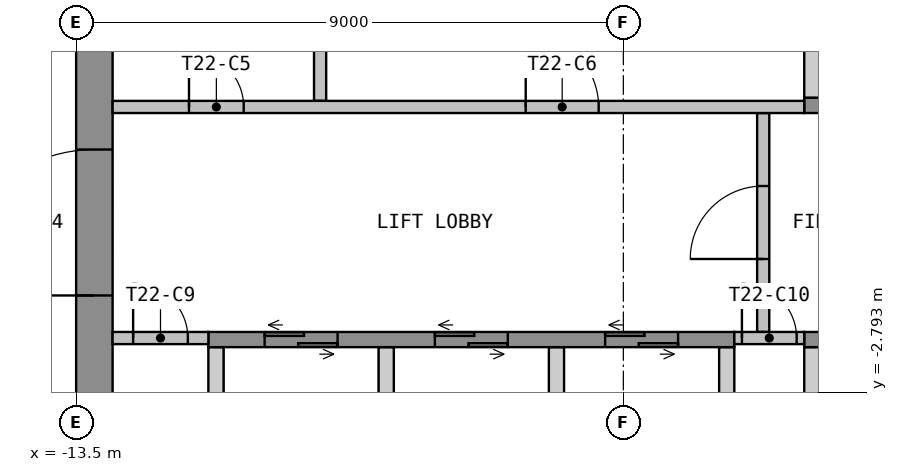
"""IFC4 building model, lengths in metres.
Left out: names, types, materials, properties, quantities, classifications, styles, units other than length and angle.
Written with IfcOpenShell. Run it as: python <this file> out.ifc"""

import sys

from ifc_helpers import new_model, si_unit, direction, frame, frame_2d, origin, place, context, subcontext, project, spatial, polyline, rectangle, outline, extrude, element, fill, save


model = new_model("IFC4")
c1 = context("Model", 3, precision=1e-05, world=origin(), true_north=direction((0.0, 1.0)))
c2 = subcontext(c1, "Body", "Model", "MODEL_VIEW")
j1 = project(units=[si_unit("LENGTHUNIT", "METRE"), si_unit("PLANEANGLEUNIT", "RADIAN")], contexts=[c1])
p1 = place(None, origin())
s1 = spatial("IfcSite", under=j1, at=p1, CompositionType="ELEMENT")
p2 = place(p1, origin())
s2 = spatial("IfcBuilding", under=s1, at=p2, CompositionType="ELEMENT")
p3 = place(p2, frame((0.0, 0.0, 298.2)))
s3 = spatial("IfcBuildingStorey", under=s2, at=p3, CompositionType="ELEMENT", Elevation=298.2)
p4 = place(p3, frame((-13.2, -10.65, 0.0), z_axis=(0.0, 0.0, 1.0), x_axis=(0.0, 1.0, 0.0)))
e1 = element("IfcWall", 1, at=p4, inside=s3, PredefinedType="SHEAR", context=c2, shape_type="SweptSolid", body=[
    extrude(rectangle(XDim=21.3, YDim=0.6, at=frame_2d((10.65, 0.0))), origin(), (0.0, 0.0, 1.0), 3.575),
])
p5 = place(p4, frame((9.45, 0.0, 0.0)))
e2 = element("IfcOpeningElement", 2, at=p5, cuts=e1, PredefinedType="OPENING", context=c2, shape_type="SweptSolid", body=[
    extrude(rectangle(XDim=2.4, YDim=2.1, at=frame_2d((1.2, 1.05))), frame((0.0, 0.31, 0.0), z_axis=(0.0, -1.0, 0.0), x_axis=(1.0, 0.0, 0.0)), (0.0, 0.0, 1.0), 0.62),
])
p6 = place(p3, origin())
e3 = element("IfcWall", 3, at=p6, inside=s3, PredefinedType="SHEAR", context=c2, shape_type="SweptSolid", body=[
    extrude(outline(polyline([(-1.525, 2.05), (-1.275, 2.05), (-1.275, 4.75), (-1.525, 4.75), (-1.525, 2.05)])), origin(), (0.0, 0.0, 1.0), 3.575),
])
p7 = place(p3, frame((-1.525, 1.925, 0.0), z_axis=(0.0, 0.0, 1.0), x_axis=(1.0, 0.0, 0.0)))
e4 = element("IfcWall", 4, at=p7, inside=s3, PredefinedType="SHEAR", context=c2, shape_type="SweptSolid", body=[
    extrude(rectangle(XDim=3.05, YDim=0.25, at=frame_2d((1.525, 0.0))), origin(), (0.0, 0.0, 1.0), 3.575),
])
p8 = place(p7, frame((0.925, 0.0, 0.0)))
e5 = element("IfcOpeningElement", 5, at=p8, cuts=e4, PredefinedType="OPENING", context=c2, shape_type="SweptSolid", body=[
    extrude(rectangle(XDim=1.2, YDim=2.1, at=frame_2d((0.6, 1.05))), frame((0.0, 0.135, 0.0), z_axis=(0.0, -1.0, 0.0), x_axis=(1.0, 0.0, 0.0)), (0.0, 0.0, 1.0), 0.27),
])
p9 = place(p3, origin())
e6 = element("IfcWall", 6, at=p9, inside=s3, PredefinedType="SHEAR", context=c2, shape_type="SweptSolid", body=[
    extrude(outline(polyline([(-11.325, -4.75), (-11.075, -4.75), (-11.075, -2.05), (-11.325, -2.05), (-11.325, -4.75)])), origin(), (0.0, 0.0, 1.0), 3.575),
])
p10 = place(p3, origin())
e7 = element("IfcWall", 7, at=p10, inside=s3, PredefinedType="SHEAR", context=c2, shape_type="SweptSolid", body=[
    extrude(outline(polyline([(-8.525, -4.75), (-8.275, -4.75), (-8.275, -2.05), (-8.525, -2.05), (-8.525, -4.75)])), origin(), (0.0, 0.0, 1.0), 3.575),
])
p11 = place(p3, origin())
e8 = element("IfcWall", 8, at=p11, inside=s3, PredefinedType="SHEAR", context=c2, shape_type="SweptSolid", body=[
    extrude(outline(polyline([(-5.725, -4.75), (-5.475, -4.75), (-5.475, -2.05), (-5.725, -2.05), (-5.725, -4.75)])), origin(), (0.0, 0.0, 1.0), 3.575),
])
p12 = place(p3, origin())
e9 = element("IfcWall", 9, at=p12, inside=s3, PredefinedType="SHEAR", context=c2, shape_type="SweptSolid", body=[
    extrude(outline(polyline([(-2.925, -4.75), (-2.675, -4.75), (-2.675, -2.05), (-2.925, -2.05), (-2.925, -4.75)])), origin(), (0.0, 0.0, 1.0), 3.575),
])
p13 = place(p3, origin())
e10 = element("IfcWall", 10, at=p13, inside=s3, PredefinedType="SHEAR", context=c2, shape_type="SweptSolid", body=[
    extrude(outline(polyline([(-1.525, -4.75), (-1.275, -4.75), (-1.275, -2.05), (-1.525, -2.05), (-1.525, -4.75)])), origin(), (0.0, 0.0, 1.0), 3.575),
])
p14 = place(p3, frame((-11.325, -1.925, 0.0), z_axis=(0.0, 0.0, 1.0), x_axis=(1.0, 0.0, 0.0)))
e11 = element("IfcWall", 11, at=p14, inside=s3, PredefinedType="SHEAR", context=c2, shape_type="SweptSolid", body=[
    extrude(rectangle(XDim=8.65, YDim=0.25, at=frame_2d((4.325, 0.0))), origin(), (0.0, 0.0, 1.0), 3.575),
])
p15 = place(p14, frame((0.925, 0.0, 0.0)))
e12 = element("IfcOpeningElement", 12, at=p15, cuts=e11, PredefinedType="OPENING", context=c2, shape_type="SweptSolid", body=[
    extrude(rectangle(XDim=1.2, YDim=2.1, at=frame_2d((0.6, 1.05))), frame((0.0, 0.135, 0.0), z_axis=(0.0, -1.0, 0.0), x_axis=(1.0, 0.0, 0.0)), (0.0, 0.0, 1.0), 0.27),
])
p16 = place(p14, frame((3.725, 0.0, 0.0)))
e13 = element("IfcOpeningElement", 13, at=p16, cuts=e11, PredefinedType="OPENING", context=c2, shape_type="SweptSolid", body=[
    extrude(rectangle(XDim=1.2, YDim=2.1, at=frame_2d((0.6, 1.05))), frame((0.0, 0.135, 0.0), z_axis=(0.0, -1.0, 0.0), x_axis=(1.0, 0.0, 0.0)), (0.0, 0.0, 1.0), 0.27),
])
p17 = place(p14, frame((6.525, 0.0, 0.0)))
e14 = element("IfcOpeningElement", 14, at=p17, cuts=e11, PredefinedType="OPENING", context=c2, shape_type="SweptSolid", body=[
    extrude(rectangle(XDim=1.2, YDim=2.1, at=frame_2d((0.6, 1.05))), frame((0.0, 0.135, 0.0), z_axis=(0.0, -1.0, 0.0), x_axis=(1.0, 0.0, 0.0)), (0.0, 0.0, 1.0), 0.27),
])
p18 = place(p3, frame((-1.525, -1.925, 0.0), z_axis=(0.0, 0.0, 1.0), x_axis=(1.0, 0.0, 0.0)))
e15 = element("IfcWall", 15, at=p18, inside=s3, PredefinedType="SHEAR", context=c2, shape_type="SweptSolid", body=[
    extrude(rectangle(XDim=5.85, YDim=0.25, at=frame_2d((2.925, 0.0))), origin(), (0.0, 0.0, 1.0), 3.575),
])
p19 = place(p18, frame((0.925, 0.0, 0.0)))
e16 = element("IfcOpeningElement", 16, at=p19, cuts=e15, PredefinedType="OPENING", context=c2, shape_type="SweptSolid", body=[
    extrude(rectangle(XDim=1.2, YDim=2.1, at=frame_2d((0.6, 1.05))), frame((0.0, 0.135, 0.0), z_axis=(0.0, -1.0, 0.0), x_axis=(1.0, 0.0, 0.0)), (0.0, 0.0, 1.0), 0.27),
])
p20 = place(p18, frame((3.725, 0.0, 0.0)))
e17 = element("IfcOpeningElement", 17, at=p20, cuts=e15, PredefinedType="OPENING", context=c2, shape_type="SweptSolid", body=[
    extrude(rectangle(XDim=1.2, YDim=2.1, at=frame_2d((0.6, 1.05))), frame((0.0, 0.135, 0.0), z_axis=(0.0, -1.0, 0.0), x_axis=(1.0, 0.0, 0.0)), (0.0, 0.0, 1.0), 0.27),
])
p21 = place(p3, frame((-2.2, -1.8, 0.0), z_axis=(0.0, 0.0, 1.0), x_axis=(0.0, 1.0, 0.0)))
e18 = element("IfcWall", 18, at=p21, inside=s3, PredefinedType="PARTITIONING", context=c2, shape_type="SweptSolid", body=[
    extrude(rectangle(XDim=3.6, YDim=0.2, at=frame_2d((1.8, 0.0))), origin(), (0.0, 0.0, 1.0), 3.575),
])
p22 = place(p21, frame((1.2, 0.0, 0.0)))
e19 = element("IfcOpeningElement", 19, at=p22, cuts=e18, PredefinedType="OPENING", context=c2, shape_type="SweptSolid", body=[
    extrude(rectangle(XDim=1.2, YDim=2.1, at=frame_2d((0.6, 1.05))), frame((0.0, 0.11, 0.0), z_axis=(0.0, -1.0, 0.0), x_axis=(1.0, 0.0, 0.0)), (0.0, 0.0, 1.0), 0.22),
])
p23 = place(p3, frame((-9.488, 2.0, 0.0), z_axis=(0.0, 0.0, 1.0), x_axis=(0.0, 1.0, 0.0)))
e20 = element("IfcWall", 20, at=p23, inside=s3, PredefinedType="PARTITIONING", context=c2, shape_type="SweptSolid", body=[
    extrude(rectangle(XDim=2.8, YDim=0.2, at=frame_2d((1.4, 0.0))), origin(), (0.0, 0.0, 1.0), 3.575),
])
p24 = place(p3, frame((-12.9, 1.9, 0.0), z_axis=(0.0, 0.0, 1.0), x_axis=(1.0, 0.0, 0.0)))
e21 = element("IfcWall", 21, at=p24, inside=s3, PredefinedType="PARTITIONING", context=c2, shape_type="SweptSolid", body=[
    extrude(rectangle(XDim=11.375, YDim=0.2, at=frame_2d((5.688, 0.0))), origin(), (0.0, 0.0, 1.0), 3.575),
])
p25 = place(p24, frame((1.256, 0.0, 0.0)))
e22 = element("IfcOpeningElement", 22, at=p25, cuts=e21, PredefinedType="OPENING", context=c2, shape_type="SweptSolid", body=[
    extrude(rectangle(XDim=0.9, YDim=2.1, at=frame_2d((0.45, 1.05))), frame((0.0, 0.11, 0.0), z_axis=(0.0, -1.0, 0.0), x_axis=(1.0, 0.0, 0.0)), (0.0, 0.0, 1.0), 0.22),
])
p26 = place(p24, frame((6.794, 0.0, 0.0)))
e23 = element("IfcOpeningElement", 23, at=p26, cuts=e21, PredefinedType="OPENING", context=c2, shape_type="SweptSolid", body=[
    extrude(rectangle(XDim=1.2, YDim=2.1, at=frame_2d((0.6, 1.05))), frame((0.0, 0.11, 0.0), z_axis=(0.0, -1.0, 0.0), x_axis=(1.0, 0.0, 0.0)), (0.0, 0.0, 1.0), 0.22),
])
p27 = place(p3, frame((-12.9, -1.9, 0.0), z_axis=(0.0, 0.0, 1.0), x_axis=(1.0, 0.0, 0.0)))
e24 = element("IfcWall", 24, at=p27, inside=s3, PredefinedType="PARTITIONING", context=c2, shape_type="SweptSolid", body=[
    extrude(rectangle(XDim=1.575, YDim=0.2, at=frame_2d((0.788, 0.0))), origin(), (0.0, 0.0, 1.0), 3.575),
])
p28 = place(p27, frame((0.337, 0.0, 0.0)))
e25 = element("IfcOpeningElement", 25, at=p28, cuts=e24, PredefinedType="OPENING", context=c2, shape_type="SweptSolid", body=[
    extrude(rectangle(XDim=0.9, YDim=2.1, at=frame_2d((0.45, 1.05))), frame((0.0, 0.11, 0.0), z_axis=(0.0, -1.0, 0.0), x_axis=(1.0, 0.0, 0.0)), (0.0, 0.0, 1.0), 0.22),
])
p29 = place(p3, frame((-2.675, -1.9, 0.0), z_axis=(0.0, 0.0, 1.0), x_axis=(1.0, 0.0, 0.0)))
e26 = element("IfcWall", 26, at=p29, inside=s3, PredefinedType="PARTITIONING", context=c2, shape_type="SweptSolid", body=[
    extrude(rectangle(XDim=1.15, YDim=0.2, at=frame_2d((0.575, 0.0))), origin(), (0.0, 0.0, 1.0), 3.575),
])
p30 = place(p29, frame((0.125, 0.0, 0.0)))
e27 = element("IfcOpeningElement", 27, at=p30, cuts=e26, PredefinedType="OPENING", context=c2, shape_type="SweptSolid", body=[
    extrude(rectangle(XDim=0.9, YDim=2.1, at=frame_2d((0.45, 1.05))), frame((0.0, 0.11, 0.0), z_axis=(0.0, -1.0, 0.0), x_axis=(1.0, 0.0, 0.0)), (0.0, 0.0, 1.0), 0.22),
])
p31 = place(p5, origin())
e28 = element("IfcDoor", 28, at=p31, inside=s3, OperationType="DOUBLE_DOOR_DOUBLE_SWING", PredefinedType="DOOR", context=c2, shape_type="SweptSolid", body=[
    extrude(rectangle(XDim=2.4, YDim=2.1, at=frame_2d((1.2, 1.05))), frame((0.0, 0.025, 0.0), z_axis=(0.0, -1.0, 0.0), x_axis=(1.0, 0.0, 0.0)), (0.0, 0.0, 1.0), 0.05),
])
fill(e2, e28)
p32 = place(p15, origin())
e29 = element("IfcDoor", 29, at=p32, inside=s3, OperationType="DOUBLE_DOOR_SLIDING", PredefinedType="DOOR", context=c2, shape_type="SweptSolid", body=[
    extrude(rectangle(XDim=1.2, YDim=2.1, at=frame_2d((0.6, 1.05))), frame((0.0, 0.025, 0.0), z_axis=(0.0, -1.0, 0.0), x_axis=(1.0, 0.0, 0.0)), (0.0, 0.0, 1.0), 0.05),
])
fill(e12, e29)
p33 = place(p16, origin())
e30 = element("IfcDoor", 30, at=p33, inside=s3, OperationType="DOUBLE_DOOR_SLIDING", PredefinedType="DOOR", context=c2, shape_type="SweptSolid", body=[
    extrude(rectangle(XDim=1.2, YDim=2.1, at=frame_2d((0.6, 1.05))), frame((0.0, 0.025, 0.0), z_axis=(0.0, -1.0, 0.0), x_axis=(1.0, 0.0, 0.0)), (0.0, 0.0, 1.0), 0.05),
])
fill(e13, e30)
p34 = place(p17, origin())
e31 = element("IfcDoor", 31, at=p34, inside=s3, OperationType="DOUBLE_DOOR_SLIDING", PredefinedType="DOOR", context=c2, shape_type="SweptSolid", body=[
    extrude(rectangle(XDim=1.2, YDim=2.1, at=frame_2d((0.6, 1.05))), frame((0.0, 0.025, 0.0), z_axis=(0.0, -1.0, 0.0), x_axis=(1.0, 0.0, 0.0)), (0.0, 0.0, 1.0), 0.05),
])
fill(e14, e31)
p35 = place(p22, origin())
e32 = element("IfcDoor", 32, at=p35, inside=s3, OperationType="SINGLE_SWING_LEFT", PredefinedType="DOOR", context=c2, shape_type="SweptSolid", body=[
    extrude(rectangle(XDim=1.2, YDim=2.1, at=frame_2d((0.6, 1.05))), frame((0.0, 0.025, 0.0), z_axis=(0.0, -1.0, 0.0), x_axis=(1.0, 0.0, 0.0)), (0.0, 0.0, 1.0), 0.05),
])
fill(e19, e32)
p36 = place(p25, origin())
e33 = element("IfcDoor", 33, at=p36, inside=s3, OperationType="SINGLE_SWING_LEFT", PredefinedType="DOOR", context=c2, shape_type="SweptSolid", body=[
    extrude(rectangle(XDim=0.9, YDim=2.1, at=frame_2d((0.45, 1.05))), frame((0.0, 0.025, 0.0), z_axis=(0.0, -1.0, 0.0), x_axis=(1.0, 0.0, 0.0)), (0.0, 0.0, 1.0), 0.05),
])
fill(e22, e33)
p37 = place(p26, origin())
e34 = element("IfcDoor", 34, at=p37, inside=s3, OperationType="SINGLE_SWING_RIGHT", PredefinedType="DOOR", context=c2, shape_type="SweptSolid", body=[
    extrude(rectangle(XDim=1.2, YDim=2.1, at=frame_2d((0.6, 1.05))), frame((0.0, 0.025, 0.0), z_axis=(0.0, -1.0, 0.0), x_axis=(1.0, 0.0, 0.0)), (0.0, 0.0, 1.0), 0.05),
])
fill(e23, e34)
p38 = place(p28, origin())
e35 = element("IfcDoor", 35, at=p38, inside=s3, OperationType="SINGLE_SWING_LEFT", PredefinedType="DOOR", context=c2, shape_type="SweptSolid", body=[
    extrude(rectangle(XDim=0.9, YDim=2.1, at=frame_2d((0.45, 1.05))), frame((0.0, 0.025, 0.0), z_axis=(0.0, -1.0, 0.0), x_axis=(1.0, 0.0, 0.0)), (0.0, 0.0, 1.0), 0.05),
])
fill(e25, e35)
p39 = place(p30, origin())
e36 = element("IfcDoor", 36, at=p39, inside=s3, OperationType="SINGLE_SWING_LEFT", PredefinedType="DOOR", context=c2, shape_type="SweptSolid", body=[
    extrude(rectangle(XDim=0.9, YDim=2.1, at=frame_2d((0.45, 1.05))), frame((0.0, 0.025, 0.0), z_axis=(0.0, -1.0, 0.0), x_axis=(1.0, 0.0, 0.0)), (0.0, 0.0, 1.0), 0.05),
])
fill(e27, e36)
save(model, sys.argv[1])
